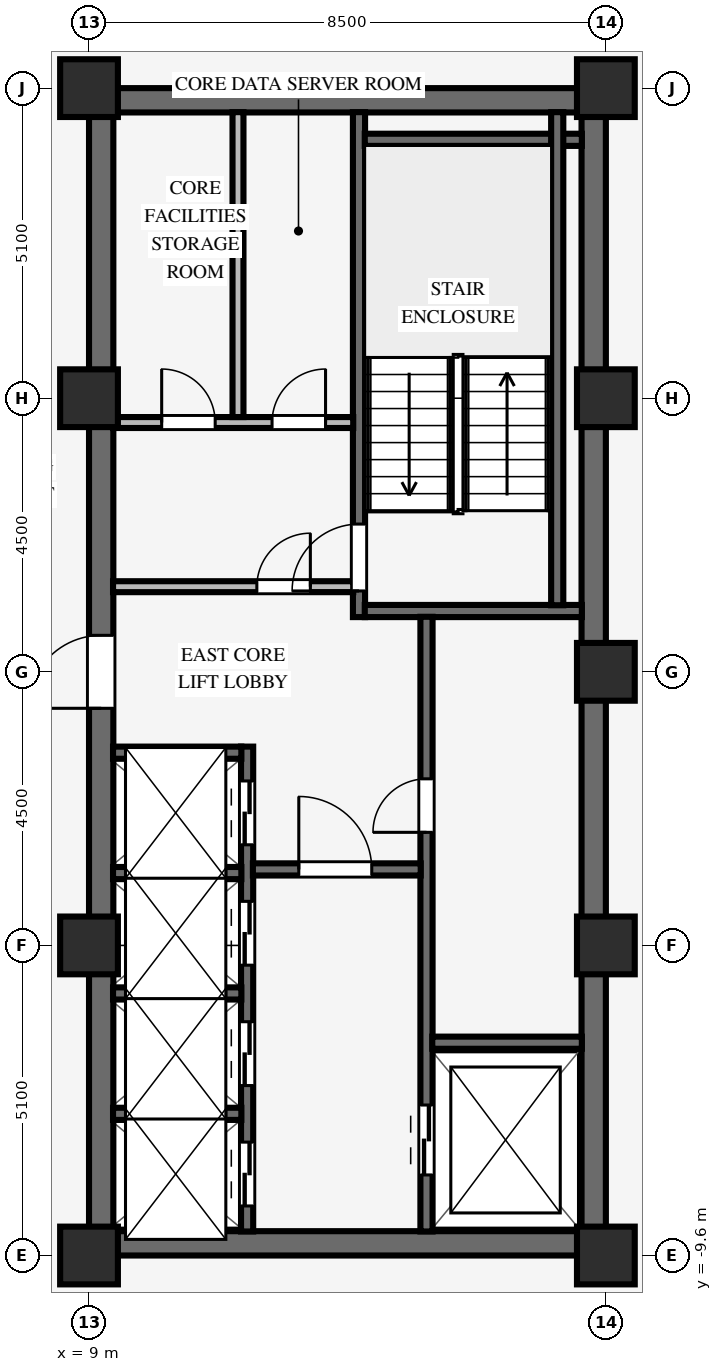
"""IFC4 building model, lengths in metres.
Left out: names, types, materials, properties, quantities, classifications, styles, units other than length and angle.
Written with IfcOpenShell. Run it as: python <this file> out.ifc"""

import sys

from ifc_helpers import new_model, si_unit, direction, frame, frame_2d, origin, origin_2d, place, context, subcontext, project, spatial, rectangle, extrude, source, transform, mapped, element, fill, save


model = new_model("IFC4")
c1 = context("Model", 3, precision=1e-05, world=origin(), true_north=direction((0.0, 1.0)))
c2 = subcontext(c1, "Body", "Model", "MODEL_VIEW")
j1 = project(units=[si_unit("LENGTHUNIT", "METRE"), si_unit("PLANEANGLEUNIT", "RADIAN")], contexts=[c1])
p1 = place(None, origin())
s1 = spatial("IfcSite", under=j1, at=p1, CompositionType="ELEMENT")
p2 = place(p1, origin())
s2 = spatial("IfcBuilding", under=s1, at=p2, CompositionType="ELEMENT")
p3 = place(p2, frame((0.0, 0.0, 123.85)))
s3 = spatial("IfcBuildingStorey", under=s2, at=p3, CompositionType="ELEMENT", Elevation=123.85)
for number, where, z_axis, x_axis in (
    (1, (9.0, -9.4, 0.0), (0.0, 0.0, 1.0), (1.0, 0.0, 0.0)),
    (2, (9.0, 9.4, 0.0), (0.0, 0.0, 1.0), (1.0, 0.0, 0.0)),
):
    element("IfcWall", number, at=place(p3, frame(where, z_axis=z_axis, x_axis=x_axis)), inside=s3, PredefinedType="SHEAR", context=c2, shape_type="SweptSolid", body=[
        extrude(rectangle(XDim=8.5, YDim=0.4, at=frame_2d((4.25, 0.0))), origin(), (0.0, 0.0, 1.0), 3.37),
    ])
p4 = place(p3, frame((9.2, -9.205, 0.0), z_axis=(0.0, 0.0, 1.0), x_axis=(0.0, 1.0, 0.0)))
e3 = element("IfcWall", 3, at=p4, inside=s3, PredefinedType="SHEAR", context=c2, shape_type="SweptSolid", body=[
    extrude(rectangle(XDim=18.41, YDim=0.4, at=frame_2d((9.205, 0.0))), origin(), (0.0, 0.0, 1.0), 3.37),
])
p5 = place(p4, frame((8.605, 0.0, 0.0)))
e4 = element("IfcOpeningElement", 4, at=p5, cuts=e3, PredefinedType="OPENING", context=c2, shape_type="SweptSolid", body=[
    extrude(rectangle(XDim=1.2, YDim=2.15, at=frame_2d((0.6, 1.075))), frame((0.0, 0.21, 0.0), z_axis=(0.0, -1.0, 0.0), x_axis=(1.0, 0.0, 0.0)), (0.0, 0.0, 1.0), 0.42),
])
p6 = place(p3, frame((17.3, -9.205, 0.0), z_axis=(0.0, 0.0, 1.0), x_axis=(0.0, 1.0, 0.0)))
e5 = element("IfcWall", 5, at=p6, inside=s3, PredefinedType="SHEAR", context=c2, shape_type="SweptSolid", body=[
    extrude(rectangle(XDim=18.41, YDim=0.4, at=frame_2d((9.205, 0.0))), origin(), (0.0, 0.0, 1.0), 3.37),
])
for number, where, z_axis, x_axis in (
    (6, (9.0, -9.6, 0.0), (0.0, 0.0, 1.0), (1.0, 0.0, 0.0)),
    (7, (9.0, -4.5, 0.0), (0.0, 0.0, 1.0), (1.0, 0.0, 0.0)),
    (8, (9.0, 4.5, 0.0), (0.0, 0.0, 1.0), (1.0, 0.0, 0.0)),
    (9, (9.0, 9.6, 0.0), (0.0, 0.0, 1.0), (1.0, 0.0, 0.0)),
    (10, (17.5, -9.6, 0.0), (0.0, 0.0, 1.0), (1.0, 0.0, 0.0)),
    (11, (17.5, -4.5, 0.0), (0.0, 0.0, 1.0), (1.0, 0.0, 0.0)),
    (12, (17.5, 4.5, 0.0), (0.0, 0.0, 1.0), (1.0, 0.0, 0.0)),
    (13, (17.5, 9.6, 0.0), (0.0, 0.0, 1.0), (1.0, 0.0, 0.0)),
    (14, (17.5, 0.0, 0.0), (0.0, 0.0, 1.0), (1.0, 0.0, 0.0)),
):
    element("IfcColumn", number, at=place(p3, frame(where, z_axis=z_axis, x_axis=x_axis)), inside=s3, PredefinedType="COLUMN", context=c2, shape_type="SweptSolid", body=[
        extrude(rectangle(XDim=0.95, YDim=0.95, at=origin_2d()), origin(), (0.0, 0.0, 1.0), 3.37),
    ])
p7 = place(p3, frame((13.44, 0.9, 0.0), z_axis=(0.0, 0.0, 1.0), x_axis=(0.0, 1.0, 0.0)))
e15 = element("IfcWall", 15, at=p7, inside=s3, PredefinedType="SHEAR", context=c2, shape_type="SweptSolid", body=[
    extrude(rectangle(XDim=8.305, YDim=0.2, at=frame_2d((4.153, 0.0))), origin(), (0.0, 0.0, 1.0), 3.37),
])
p8 = place(p7, frame((0.43, 0.0, 0.0)))
e16 = element("IfcOpeningElement", 16, at=p8, cuts=e15, PredefinedType="OPENING", context=c2, shape_type="SweptSolid", body=[
    extrude(rectangle(XDim=1.1, YDim=2.15, at=frame_2d((0.55, 1.075))), frame((0.0, 0.11, 0.0), z_axis=(0.0, -1.0, 0.0), x_axis=(1.0, 0.0, 0.0)), (0.0, 0.0, 1.0), 0.22),
])
for number, where, z_axis, x_axis in (
    (17, (13.535, 1.0, 0.0), (0.0, 0.0, 1.0), (1.0, 0.0, 0.0)),
    (18, (13.535, 8.75, 0.0), (0.0, 0.0, 1.0), (1.0, 0.0, 0.0)),
):
    element("IfcWall", number, at=place(p3, frame(where, z_axis=z_axis, x_axis=x_axis)), inside=s3, PredefinedType="SHEAR", context=c2, shape_type="SweptSolid", body=[
        extrude(rectangle(XDim=3.57, YDim=0.2, at=frame_2d((1.785, 0.0))), origin(), (0.0, 0.0, 1.0), 3.37),
    ])
p9 = place(p3, frame((16.7, 1.095, 0.0), z_axis=(0.0, 0.0, 1.0), x_axis=(0.0, 1.0, 0.0)))
e19 = element("IfcWall", 19, at=p9, inside=s3, PredefinedType="SHEAR", context=c2, shape_type="SweptSolid", body=[
    extrude(rectangle(XDim=8.11, YDim=0.2, at=frame_2d((4.055, 0.0))), origin(), (0.0, 0.0, 1.0), 3.37),
])
p10 = place(p3, frame((14.55, -9.205, 0.0), z_axis=(0.0, 0.0, 1.0), x_axis=(0.0, 1.0, 0.0)))
e20 = element("IfcWall", 20, at=p10, inside=s3, PredefinedType="SHEAR", context=c2, shape_type="SweptSolid", body=[
    extrude(rectangle(XDim=10.11, YDim=0.2, at=frame_2d((5.055, 0.0))), origin(), (0.0, 0.0, 1.0), 3.37),
])
p11 = place(p10, frame((6.565, 0.0, 0.0)))
e21 = element("IfcOpeningElement", 21, at=p11, cuts=e20, PredefinedType="OPENING", context=c2, shape_type="SweptSolid", body=[
    extrude(rectangle(XDim=0.88, YDim=2.1, at=frame_2d((0.44, 1.05))), frame((0.0, 0.11, 0.0), z_axis=(0.0, -1.0, 0.0), x_axis=(1.0, 0.0, 0.0)), (0.0, 0.0, 1.0), 0.22),
])
p12 = place(p10, frame((0.93, 0.0, 0.0)))
e22 = element("IfcOpeningElement", 22, at=p12, cuts=e20, PredefinedType="OPENING", context=c2, shape_type="SweptSolid", body=[
    extrude(rectangle(XDim=1.15, YDim=2.15, at=frame_2d((0.575, 1.075))), frame((0.0, 0.11, 0.0), z_axis=(0.0, -1.0, 0.0), x_axis=(1.0, 0.0, 0.0)), (0.0, 0.0, 1.0), 0.22),
])
p13 = place(p3, frame((14.645, -6.1, 0.0), z_axis=(0.0, 0.0, 1.0), x_axis=(1.0, 0.0, 0.0)))
e23 = element("IfcWall", 23, at=p13, inside=s3, PredefinedType="SHEAR", context=c2, shape_type="SweptSolid", body=[
    extrude(rectangle(XDim=2.46, YDim=0.2, at=frame_2d((1.23, 0.0))), origin(), (0.0, 0.0, 1.0), 3.37),
])
p14 = place(p3, frame((11.6, -9.205, 0.0), z_axis=(0.0, 0.0, 1.0), x_axis=(0.0, 1.0, 0.0)))
e24 = element("IfcWall", 24, at=p14, inside=s3, PredefinedType="SHEAR", context=c2, shape_type="SweptSolid", body=[
    extrude(rectangle(XDim=7.975, YDim=0.2, at=frame_2d((3.988, 0.0))), origin(), (0.0, 0.0, 1.0), 3.37),
])
p15 = place(p14, frame((0.42, 0.0, 0.0)))
e25 = element("IfcOpeningElement", 25, at=p15, cuts=e24, PredefinedType="OPENING", context=c2, shape_type="SweptSolid", body=[
    extrude(rectangle(XDim=1.05, YDim=2.15, at=frame_2d((0.525, 1.075))), frame((0.0, 0.11, 0.0), z_axis=(0.0, -1.0, 0.0), x_axis=(1.0, 0.0, 0.0)), (0.0, 0.0, 1.0), 0.22),
])
p16 = place(p14, frame((2.4, 0.0, 0.0)))
e26 = element("IfcOpeningElement", 26, at=p16, cuts=e24, PredefinedType="OPENING", context=c2, shape_type="SweptSolid", body=[
    extrude(rectangle(XDim=1.05, YDim=2.15, at=frame_2d((0.525, 1.075))), frame((0.0, 0.11, 0.0), z_axis=(0.0, -1.0, 0.0), x_axis=(1.0, 0.0, 0.0)), (0.0, 0.0, 1.0), 0.22),
])
p17 = place(p14, frame((4.38, 0.0, 0.0)))
e27 = element("IfcOpeningElement", 27, at=p17, cuts=e24, PredefinedType="OPENING", context=c2, shape_type="SweptSolid", body=[
    extrude(rectangle(XDim=1.05, YDim=2.15, at=frame_2d((0.525, 1.075))), frame((0.0, 0.11, 0.0), z_axis=(0.0, -1.0, 0.0), x_axis=(1.0, 0.0, 0.0)), (0.0, 0.0, 1.0), 0.22),
])
p18 = place(p14, frame((6.36, 0.0, 0.0)))
e28 = element("IfcOpeningElement", 28, at=p18, cuts=e24, PredefinedType="OPENING", context=c2, shape_type="SweptSolid", body=[
    extrude(rectangle(XDim=1.05, YDim=2.15, at=frame_2d((0.525, 1.075))), frame((0.0, 0.11, 0.0), z_axis=(0.0, -1.0, 0.0), x_axis=(1.0, 0.0, 0.0)), (0.0, 0.0, 1.0), 0.22),
])
p19 = place(p3, frame((11.695, -3.25, 0.0), z_axis=(0.0, 0.0, 1.0), x_axis=(1.0, 0.0, 0.0)))
e29 = element("IfcWall", 29, at=p19, inside=s3, PredefinedType="SHEAR", context=c2, shape_type="SweptSolid", body=[
    extrude(rectangle(XDim=2.76, YDim=0.2, at=frame_2d((1.38, 0.0))), origin(), (0.0, 0.0, 1.0), 3.37),
])
p20 = place(p19, frame((0.755, 0.0, 0.0)))
e30 = element("IfcOpeningElement", 30, at=p20, cuts=e29, PredefinedType="OPENING", context=c2, shape_type="SweptSolid", body=[
    extrude(rectangle(XDim=1.2, YDim=2.15, at=frame_2d((0.6, 1.075))), frame((0.0, 0.11, 0.0), z_axis=(0.0, -1.0, 0.0), x_axis=(1.0, 0.0, 0.0)), (0.0, 0.0, 1.0), 0.22),
])
for number, where, z_axis, x_axis in (
    (31, (9.395, -7.27, 0.0), (0.0, 0.0, 1.0), (1.0, 0.0, 0.0)),
    (32, (9.395, -5.29, 0.0), (0.0, 0.0, 1.0), (1.0, 0.0, 0.0)),
    (33, (9.395, -3.31, 0.0), (0.0, 0.0, 1.0), (1.0, 0.0, 0.0)),
    (34, (9.395, -1.33, 0.0), (0.0, 0.0, 1.0), (1.0, 0.0, 0.0)),
):
    element("IfcWall", number, at=place(p3, frame(where, z_axis=z_axis, x_axis=x_axis)), inside=s3, PredefinedType="SHEAR", context=c2, shape_type="SweptSolid", body=[
        extrude(rectangle(XDim=2.11, YDim=0.2, at=frame_2d((1.055, 0.0))), origin(), (0.0, 0.0, 1.0), 3.37),
    ])
p21 = place(p3, frame((9.395, 1.4, 0.0), z_axis=(0.0, 0.0, 1.0), x_axis=(1.0, 0.0, 0.0)))
e35 = element("IfcWall", 35, at=p21, inside=s3, PredefinedType="PARTITIONING", context=c2, shape_type="SweptSolid", body=[
    extrude(rectangle(XDim=3.95, YDim=0.18, at=frame_2d((1.975, 0.0))), origin(), (0.0, 0.0, 1.0), 3.36),
])
p22 = place(p21, frame((2.365, 0.0, 0.0)))
e36 = element("IfcOpeningElement", 36, at=p22, cuts=e35, PredefinedType="OPENING", context=c2, shape_type="SweptSolid", body=[
    extrude(rectangle(XDim=0.88, YDim=2.1, at=frame_2d((0.44, 1.05))), frame((0.0, 0.1, 0.0), z_axis=(0.0, -1.0, 0.0), x_axis=(1.0, 0.0, 0.0)), (0.0, 0.0, 1.0), 0.2),
])
p23 = place(p3, frame((9.395, 4.1, 0.0), z_axis=(0.0, 0.0, 1.0), x_axis=(1.0, 0.0, 0.0)))
e37 = element("IfcWall", 37, at=p23, inside=s3, PredefinedType="PARTITIONING", context=c2, shape_type="SweptSolid", body=[
    extrude(rectangle(XDim=3.95, YDim=0.18, at=frame_2d((1.975, 0.0))), origin(), (0.0, 0.0, 1.0), 3.36),
])
p24 = place(p23, frame((0.8, 0.0, 0.0)))
e38 = element("IfcOpeningElement", 38, at=p24, cuts=e37, PredefinedType="OPENING", context=c2, shape_type="SweptSolid", body=[
    extrude(rectangle(XDim=0.88, YDim=2.1, at=frame_2d((0.44, 1.05))), frame((0.0, 0.1, 0.0), z_axis=(0.0, -1.0, 0.0), x_axis=(1.0, 0.0, 0.0)), (0.0, 0.0, 1.0), 0.2),
])
p25 = place(p23, frame((2.615, 0.0, 0.0)))
e39 = element("IfcOpeningElement", 39, at=p25, cuts=e37, PredefinedType="OPENING", context=c2, shape_type="SweptSolid", body=[
    extrude(rectangle(XDim=0.88, YDim=2.1, at=frame_2d((0.44, 1.05))), frame((0.0, 0.1, 0.0), z_axis=(0.0, -1.0, 0.0), x_axis=(1.0, 0.0, 0.0)), (0.0, 0.0, 1.0), 0.2),
])
p26 = place(p3, frame((11.45, 4.19, 0.0), z_axis=(0.0, 0.0, 1.0), x_axis=(0.0, 1.0, 0.0)))
e40 = element("IfcWall", 40, at=p26, inside=s3, PredefinedType="PARTITIONING", context=c2, shape_type="SweptSolid", body=[
    extrude(rectangle(XDim=5.015, YDim=0.18, at=frame_2d((2.508, 0.0))), origin(), (0.0, 0.0, 1.0), 3.36),
])
m1 = source(origin(), c2, "Body", "SweptSolid", [
    extrude(rectangle(XDim=1.1, YDim=2.15, at=frame_2d((0.55, 1.075))), frame((0.0, 0.025, 0.0), z_axis=(0.0, -1.0, 0.0), x_axis=(1.0, 0.0, 0.0)), (0.0, 0.0, 1.0), 0.05),
])
p27 = place(p8, origin())
e41 = element("IfcDoor", 41, at=p27, inside=s3, OperationType="SINGLE_SWING_LEFT", PredefinedType="DOOR", context=c2, shape_type="MappedRepresentation", body=[
    mapped(m1, transform((0.0, 0.0, 0.0), scale=1.0)),
])
fill(e16, e41)
m2 = source(origin(), c2, "Body", "SweptSolid", [
    extrude(rectangle(XDim=0.88, YDim=2.1, at=frame_2d((0.44, 1.05))), frame((0.0, 0.025, 0.0), z_axis=(0.0, -1.0, 0.0), x_axis=(1.0, 0.0, 0.0)), (0.0, 0.0, 1.0), 0.05),
])
p28 = place(p11, origin())
e42 = element("IfcDoor", 42, at=p28, inside=s3, OperationType="SINGLE_SWING_LEFT", PredefinedType="DOOR", context=c2, shape_type="MappedRepresentation", body=[
    mapped(m2, transform((0.0, 0.0, 0.0), scale=1.0)),
])
fill(e21, e42)
m3 = source(origin(), c2, "Body", "SweptSolid", [
    extrude(rectangle(XDim=1.2, YDim=2.15, at=frame_2d((0.6, 1.075))), frame((0.0, 0.025, 0.0), z_axis=(0.0, -1.0, 0.0), x_axis=(1.0, 0.0, 0.0)), (0.0, 0.0, 1.0), 0.05),
])
p29 = place(p20, origin())
e43 = element("IfcDoor", 43, at=p29, inside=s3, OperationType="SINGLE_SWING_LEFT", PredefinedType="DOOR", context=c2, shape_type="MappedRepresentation", body=[
    mapped(m3, transform((0.0, 0.0, 0.0), scale=1.0)),
])
fill(e30, e43)
p30 = place(p5, origin())
e44 = element("IfcDoor", 44, at=p30, inside=s3, OperationType="SINGLE_SWING_LEFT", PredefinedType="DOOR", context=c2, shape_type="MappedRepresentation", body=[
    mapped(m3, transform((0.0, 0.0, 0.0), scale=1.0)),
])
fill(e4, e44)
p31 = place(p22, origin())
e45 = element("IfcDoor", 45, at=p31, inside=s3, OperationType="SINGLE_SWING_RIGHT", PredefinedType="DOOR", context=c2, shape_type="MappedRepresentation", body=[
    mapped(m2, transform((0.0, 0.0, 0.0), scale=1.0)),
])
fill(e36, e45)
p32 = place(p24, origin())
e46 = element("IfcDoor", 46, at=p32, inside=s3, OperationType="SINGLE_SWING_LEFT", PredefinedType="DOOR", context=c2, shape_type="MappedRepresentation", body=[
    mapped(m2, transform((0.0, 0.0, 0.0), scale=1.0)),
])
fill(e38, e46)
p33 = place(p25, origin())
e47 = element("IfcDoor", 47, at=p33, inside=s3, OperationType="SINGLE_SWING_RIGHT", PredefinedType="DOOR", context=c2, shape_type="MappedRepresentation", body=[
    mapped(m2, transform((0.0, 0.0, 0.0), scale=1.0)),
])
fill(e39, e47)
m4 = source(origin(), c2, "Body", "SweptSolid", [
    extrude(rectangle(XDim=1.15, YDim=2.15, at=frame_2d((0.575, 1.075))), frame((0.0, 0.025, 0.0), z_axis=(0.0, -1.0, 0.0), x_axis=(1.0, 0.0, 0.0)), (0.0, 0.0, 1.0), 0.05),
])
p34 = place(p12, origin())
e48 = element("IfcDoor", 48, at=p34, inside=s3, OperationType="DOUBLE_DOOR_SLIDING", PredefinedType="DOOR", context=c2, shape_type="MappedRepresentation", body=[
    mapped(m4, transform((0.0, 0.0, 0.0), scale=1.0)),
])
fill(e22, e48)
m5 = source(origin(), c2, "Body", "SweptSolid", [
    extrude(rectangle(XDim=1.05, YDim=2.15, at=frame_2d((0.525, 1.075))), frame((0.0, 0.025, 0.0), z_axis=(0.0, -1.0, 0.0), x_axis=(1.0, 0.0, 0.0)), (0.0, 0.0, 1.0), 0.05),
])
p35 = place(p15, origin())
e49 = element("IfcDoor", 49, at=p35, inside=s3, OperationType="DOUBLE_DOOR_SLIDING", PredefinedType="DOOR", context=c2, shape_type="MappedRepresentation", body=[
    mapped(m5, transform((0.0, 0.0, 0.0), scale=1.0)),
])
fill(e25, e49)
p36 = place(p16, origin())
e50 = element("IfcDoor", 50, at=p36, inside=s3, OperationType="DOUBLE_DOOR_SLIDING", PredefinedType="DOOR", context=c2, shape_type="MappedRepresentation", body=[
    mapped(m5, transform((0.0, 0.0, 0.0), scale=1.0)),
])
fill(e26, e50)
p37 = place(p17, origin())
e51 = element("IfcDoor", 51, at=p37, inside=s3, OperationType="DOUBLE_DOOR_SLIDING", PredefinedType="DOOR", context=c2, shape_type="MappedRepresentation", body=[
    mapped(m5, transform((0.0, 0.0, 0.0), scale=1.0)),
])
fill(e27, e51)
p38 = place(p18, origin())
e52 = element("IfcDoor", 52, at=p38, inside=s3, OperationType="DOUBLE_DOOR_SLIDING", PredefinedType="DOOR", context=c2, shape_type="MappedRepresentation", body=[
    mapped(m5, transform((0.0, 0.0, 0.0), scale=1.0)),
])
fill(e28, e52)
save(model, sys.argv[1])
